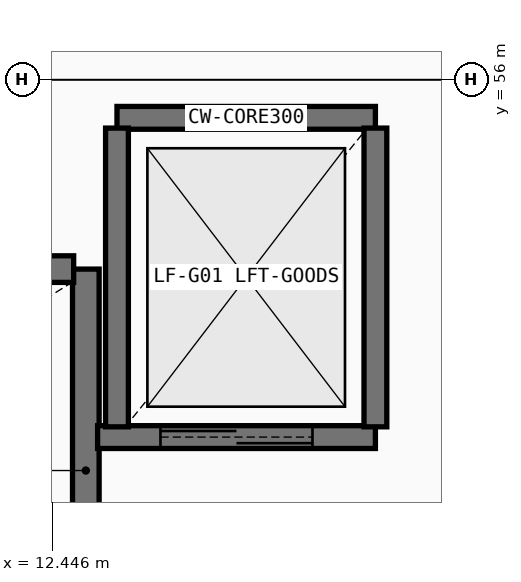
"""IFC4 building model, lengths in metres.
Left out: names, types, materials, properties, quantities, classifications, styles, units other than length and angle.
Written with IfcOpenShell. Run it as: python <this file> out.ifc"""

import sys

from ifc_helpers import new_model, si_unit, direction, frame, frame_2d, origin, place, context, subcontext, project, spatial, rectangle, extrude, element, fill, save


model = new_model("IFC4")
c1 = context("Model", 3, precision=1e-05, world=origin(), true_north=direction((0.0, 1.0)))
c2 = subcontext(c1, "Body", "Model", "MODEL_VIEW")
j1 = project(units=[si_unit("LENGTHUNIT", "METRE"), si_unit("PLANEANGLEUNIT", "RADIAN")], contexts=[c1])
p1 = place(None, origin())
s1 = spatial("IfcSite", under=j1, at=p1, CompositionType="ELEMENT")
p2 = place(p1, origin())
s2 = spatial("IfcBuilding", under=s1, at=p2, CompositionType="ELEMENT")
p3 = place(p2, origin())
s3 = spatial("IfcBuildingStorey", under=s2, at=p3, CompositionType="ELEMENT", Elevation=0.0)
p4 = place(p3, frame((12.89, 53.51, 0.0), z_axis=(0.0, 0.0, 1.0), x_axis=(0.0, -1.0, 0.0)))
e1 = element("IfcWall", 1, at=p4, inside=s3, PredefinedType="SHEAR", context=c2, shape_type="SweptSolid", body=[
    extrude(rectangle(XDim=5.3, YDim=0.35, at=frame_2d((2.65, 0.0))), origin(), (0.0, 0.0, 1.0), 5.77),
])
p5 = place(p3, frame((1.85, 53.51, 0.0), z_axis=(0.0, 0.0, 1.0), x_axis=(1.0, 0.0, 0.0)))
e2 = element("IfcWall", 2, at=p5, inside=s3, PredefinedType="SHEAR", context=c2, shape_type="SweptSolid", body=[
    extrude(rectangle(XDim=10.88, YDim=0.35, at=frame_2d((5.44, 0.0))), origin(), (0.0, 0.0, 1.0), 5.77),
])
p6 = place(p3, frame((16.7, 55.5, 0.0), z_axis=(0.0, 0.0, 1.0), x_axis=(-1.0, 0.0, 0.0)))
e3 = element("IfcWall", 3, at=p6, inside=s3, PredefinedType="SHEAR", context=c2, shape_type="SweptSolid", body=[
    extrude(rectangle(XDim=3.4, YDim=0.3, at=frame_2d((1.7, 0.0))), origin(), (0.0, 0.0, 1.0), 5.77),
])
p7 = place(p3, frame((13.045, 51.3, 0.0), z_axis=(0.0, 0.0, 1.0), x_axis=(1.0, 0.0, 0.0)))
e4 = element("IfcWall", 4, at=p7, inside=s3, PredefinedType="SHEAR", context=c2, shape_type="SweptSolid", body=[
    extrude(rectangle(XDim=3.655, YDim=0.3, at=frame_2d((1.828, 0.0))), origin(), (0.0, 0.0, 1.0), 5.77),
])
p8 = place(p7, frame((0.827, 0.0, 0.0)))
e5 = element("IfcOpeningElement", 5, at=p8, cuts=e4, PredefinedType="OPENING", context=c2, shape_type="SweptSolid", body=[
    extrude(rectangle(XDim=2.0, YDim=2.5, at=frame_2d((1.0, 1.25))), frame((0.0, 0.16, 0.0), z_axis=(0.0, -1.0, 0.0), x_axis=(1.0, 0.0, 0.0)), (0.0, 0.0, 1.0), 0.32),
])
for number, where, z_axis, x_axis in (
    (6, (16.7, 51.435, 0.0), (0.0, 0.0, 1.0), (0.0, 1.0, 0.0)),
    (7, (13.3, 55.365, 0.0), (0.0, 0.0, 1.0), (0.0, -1.0, 0.0)),
):
    element("IfcWall", number, at=place(p3, frame(where, z_axis=z_axis, x_axis=x_axis)), inside=s3, PredefinedType="SHEAR", context=c2, shape_type="SweptSolid", body=[
        extrude(rectangle(XDim=3.93, YDim=0.3, at=frame_2d((1.965, 0.0))), origin(), (0.0, 0.0, 1.0), 5.77),
    ])
p9 = place(p8, origin())
e8 = element("IfcDoor", 8, at=p9, inside=s3, OperationType="DOUBLE_DOOR_SLIDING", PredefinedType="DOOR", context=c2, shape_type="SweptSolid", body=[
    extrude(rectangle(XDim=2.0, YDim=2.5, at=frame_2d((1.0, 1.25))), frame((0.0, 0.025, 0.0), z_axis=(0.0, -1.0, 0.0), x_axis=(1.0, 0.0, 0.0)), (0.0, 0.0, 1.0), 0.05),
])
fill(e5, e8)
save(model, sys.argv[1])
